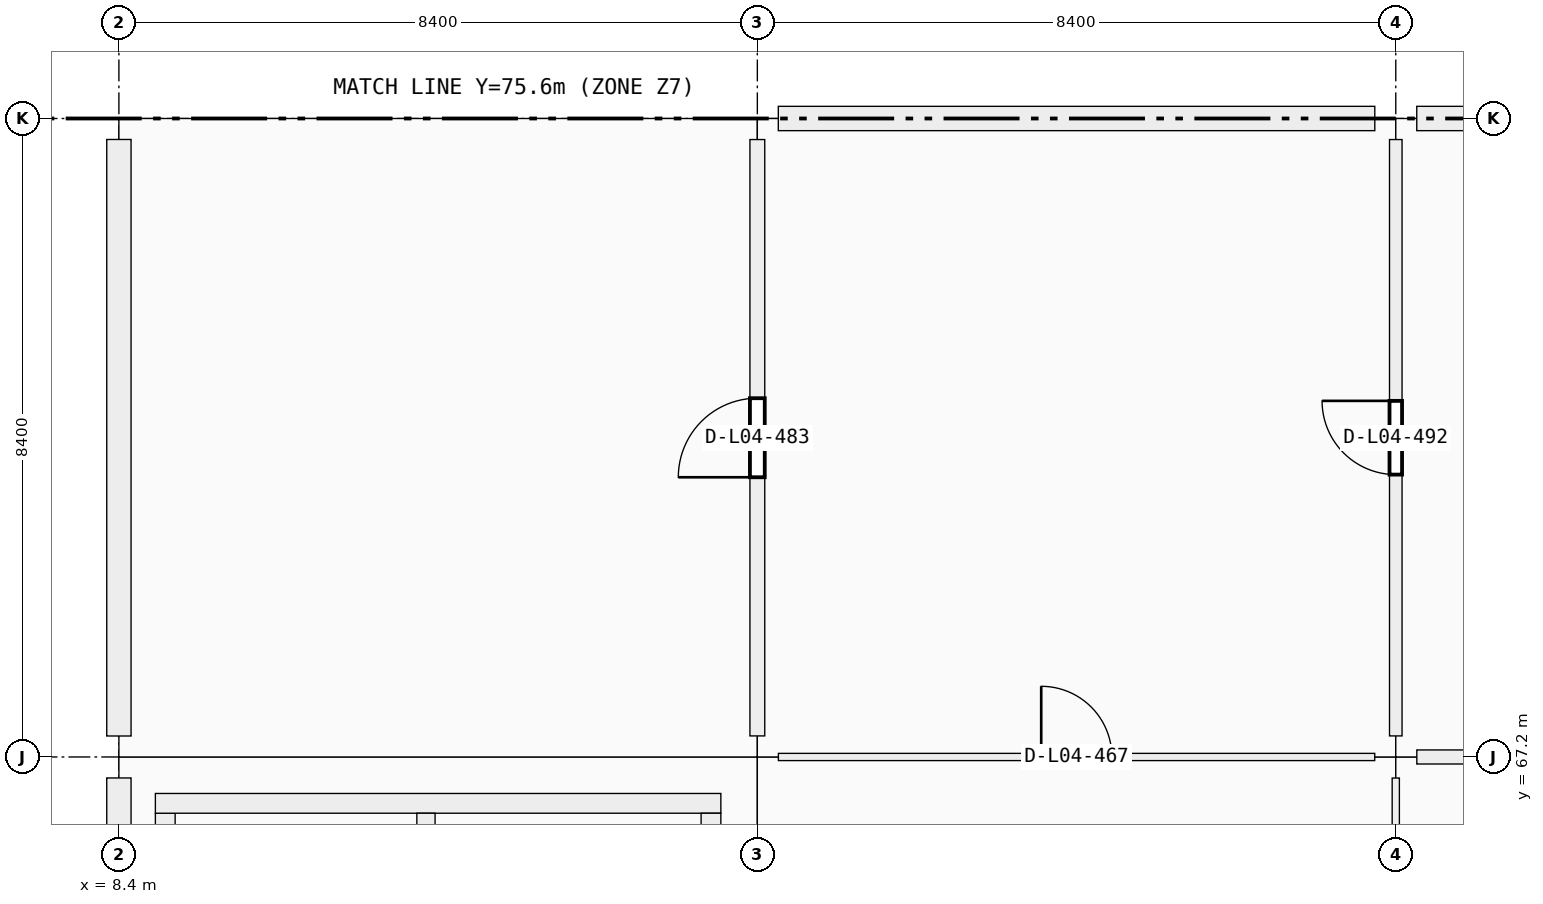
"""IFC4 building model, lengths in metres.
Left out: names, types, materials, properties, quantities, classifications, styles, units other than length and angle.
Written with IfcOpenShell. Run it as: python <this file> out.ifc"""

import sys

from ifc_helpers import new_model, si_unit, direction, frame, frame_2d, origin, origin_2d, place, context, subcontext, project, spatial, rectangle, i_section, extrude, element, fill, save


model = new_model("IFC4")
c1 = context("Model", 3, precision=1e-05, world=origin(), true_north=direction((0.0, 1.0)))
c2 = subcontext(c1, "Body", "Model", "MODEL_VIEW")
j1 = project(units=[si_unit("LENGTHUNIT", "METRE"), si_unit("PLANEANGLEUNIT", "RADIAN")], contexts=[c1])
p1 = place(None, origin())
s1 = spatial("IfcSite", under=j1, at=p1, CompositionType="ELEMENT")
p2 = place(p1, origin())
s2 = spatial("IfcBuilding", under=s1, at=p2, CompositionType="ELEMENT")
p3 = place(p2, frame((0.0, 0.0, 19.08)))
s3 = spatial("IfcBuildingStorey", under=s2, at=p3, CompositionType="ELEMENT", Elevation=19.08)
for number, where, z_axis, x_axis in (
    (1, (8.4, 67.2, 0.0), (0.0, 0.0, 1.0), (1.0, 0.0, 0.0)),
    (2, (8.4, 75.6, 0.0), (0.0, 0.0, 1.0), (1.0, 0.0, 0.0)),
    (3, (16.8, 67.2, 0.0), (0.0, 0.0, 1.0), (1.0, 0.0, 0.0)),
    (4, (16.8, 75.6, 0.0), (0.0, 0.0, 1.0), (1.0, 0.0, 0.0)),
    (5, (25.2, 67.2, 0.0), (0.0, 0.0, 1.0), (1.0, 0.0, 0.0)),
    (6, (25.2, 75.6, 0.0), (0.0, 0.0, 1.0), (1.0, 0.0, 0.0)),
):
    element("IfcColumn", number, at=place(p3, frame(where, z_axis=z_axis, x_axis=x_axis)), inside=s3, PredefinedType="COLUMN", context=c2, shape_type="SweptSolid", body=[
        extrude(rectangle(XDim=0.55, YDim=0.55, at=origin_2d()), origin(), (0.0, 0.0, 1.0), 4.16),
    ])
for number, where, z_axis, x_axis in (
    (7, (16.8, 67.2, 4.16), (0.0, 0.0, 1.0), (1.0, 0.0, 0.0)),
    (8, (25.2, 67.2, 4.16), (0.0, 0.0, 1.0), (1.0, 0.0, 0.0)),
    (9, (16.8, 75.6, 4.16), (0.0, 0.0, 1.0), (1.0, 0.0, 0.0)),
    (10, (25.2, 75.6, 4.16), (0.0, 0.0, 1.0), (1.0, 0.0, 0.0)),
):
    element("IfcColumn", number, at=place(p3, frame(where, z_axis=z_axis, x_axis=x_axis)), inside=s3, PredefinedType="COLUMN", context=c2, shape_type="SweptSolid", body=[
        extrude(i_section(OverallWidth=0.305, OverallDepth=0.308, WebThickness=0.01, FlangeThickness=0.015, FilletRadius=0.017, at=origin_2d()), origin(), (0.0, 0.0, 1.0), 1.925),
    ])
p4 = place(p3, frame((8.4, 59.076, 0.0), z_axis=(0.0, 0.0, 1.0), x_axis=(0.0, 1.0, 0.0)))
e11 = element("IfcWall", 11, at=p4, inside=s3, PredefinedType="SOLIDWALL", context=c2, shape_type="SweptSolid", body=[
    extrude(rectangle(XDim=7.848, YDim=0.32, at=frame_2d((3.924, 0.0))), origin(), (0.0, 0.0, 1.0), 3.37),
])
p5 = place(p3, frame((8.4, 67.476, 0.0), z_axis=(0.0, 0.0, 1.0), x_axis=(0.0, 1.0, 0.0)))
e12 = element("IfcWall", 12, at=p5, inside=s3, PredefinedType="SOLIDWALL", context=c2, shape_type="SweptSolid", body=[
    extrude(rectangle(XDim=7.848, YDim=0.32, at=frame_2d((3.924, 0.0))), origin(), (0.0, 0.0, 1.0), 3.37),
])
p6 = place(p3, frame((17.076, 75.6, 0.0), z_axis=(0.0, 0.0, 1.0), x_axis=(1.0, 0.0, 0.0)))
e13 = element("IfcWall", 13, at=p6, inside=s3, PredefinedType="SOLIDWALL", context=c2, shape_type="SweptSolid", body=[
    extrude(rectangle(XDim=7.848, YDim=0.32, at=frame_2d((3.924, 0.0))), origin(), (0.0, 0.0, 1.0), 3.37),
])
p7 = place(p3, frame((25.476, 75.6, 0.0), z_axis=(0.0, 0.0, 1.0), x_axis=(1.0, 0.0, 0.0)))
e14 = element("IfcWall", 14, at=p7, inside=s3, PredefinedType="SOLIDWALL", context=c2, shape_type="SweptSolid", body=[
    extrude(rectangle(XDim=7.848, YDim=0.32, at=frame_2d((3.924, 0.0))), origin(), (0.0, 0.0, 1.0), 3.37),
])
p8 = place(p7, frame((3.074, 0.0, 0.9)))
e15 = element("IfcOpeningElement", 15, at=p8, cuts=e14, PredefinedType="OPENING", context=c2, shape_type="SweptSolid", body=[
    extrude(rectangle(XDim=1.7, YDim=1.85, at=frame_2d((0.85, 0.925))), frame((0.0, 0.16, 0.0), z_axis=(0.0, -1.0, 0.0), x_axis=(1.0, 0.0, 0.0)), (0.0, 0.0, 1.0), 0.32),
])
p9 = place(p3, frame((9.01, 59.54, 0.0), z_axis=(0.0, 0.0, 1.0), x_axis=(0.0, 1.0, 0.0)))
e16 = element("IfcWall", 16, at=p9, inside=s3, PredefinedType="SHEAR", context=c2, shape_type="SweptSolid", body=[
    extrude(rectangle(XDim=6.92, YDim=0.26, at=frame_2d((3.46, 0.0))), origin(), (0.0, 0.0, 1.0), 4.07),
])
p10 = place(p3, frame((8.88, 66.59, 0.0), z_axis=(0.0, 0.0, 1.0), x_axis=(1.0, 0.0, 0.0)))
e17 = element("IfcWall", 17, at=p10, inside=s3, PredefinedType="SHEAR", context=c2, shape_type="SweptSolid", body=[
    extrude(rectangle(XDim=7.44, YDim=0.26, at=frame_2d((3.72, 0.0))), origin(), (0.0, 0.0, 1.0), 4.07),
])
p11 = place(p3, frame((16.19, 66.46, 0.0), z_axis=(0.0, 0.0, 1.0), x_axis=(0.0, -1.0, 0.0)))
e18 = element("IfcWall", 18, at=p11, inside=s3, PredefinedType="SHEAR", context=c2, shape_type="SweptSolid", body=[
    extrude(rectangle(XDim=6.92, YDim=0.26, at=frame_2d((3.46, 0.0))), origin(), (0.0, 0.0, 1.0), 4.07),
])
p12 = place(p3, frame((12.44, 59.54, 0.0), z_axis=(0.0, 0.0, 1.0), x_axis=(0.0, 1.0, 0.0)))
e19 = element("IfcWall", 19, at=p12, inside=s3, PredefinedType="SHEAR", context=c2, shape_type="SweptSolid", body=[
    extrude(rectangle(XDim=6.92, YDim=0.24, at=frame_2d((3.46, 0.0))), origin(), (0.0, 0.0, 1.0), 4.07),
])
p13 = place(p12, frame((0.12, 0.0, 0.0)))
e20 = element("IfcOpeningElement", 20, at=p13, cuts=e19, PredefinedType="OPENING", context=c2, shape_type="SweptSolid", body=[
    extrude(rectangle(XDim=1.0, YDim=2.15, at=frame_2d((0.5, 1.075))), frame((0.0, 0.12, 0.0), z_axis=(0.0, -1.0, 0.0), x_axis=(1.0, 0.0, 0.0)), (0.0, 0.0, 1.0), 0.24),
])
p14 = place(p3, frame((17.077, 67.2, 0.0), z_axis=(0.0, 0.0, 1.0), x_axis=(1.0, 0.0, 0.0)))
e21 = element("IfcWall", 21, at=p14, inside=s3, PredefinedType="PARTITIONING", context=c2, shape_type="SweptSolid", body=[
    extrude(rectangle(XDim=7.846, YDim=0.095, at=frame_2d((3.923, 0.0))), origin(), (0.0, 0.0, 1.0), 3.19),
])
p15 = place(p14, frame((3.458, 0.0, 0.0)))
e22 = element("IfcOpeningElement", 22, at=p15, cuts=e21, PredefinedType="OPENING", context=c2, shape_type="SweptSolid", body=[
    extrude(rectangle(XDim=0.93, YDim=2.12, at=frame_2d((0.465, 1.06))), frame((0.0, 0.047, 0.0), z_axis=(0.0, -1.0, 0.0), x_axis=(1.0, 0.0, 0.0)), (0.0, 0.0, 1.0), 0.095),
])
p16 = place(p3, frame((25.477, 67.2, 0.0), z_axis=(0.0, 0.0, 1.0), x_axis=(1.0, 0.0, 0.0)))
e23 = element("IfcWall", 23, at=p16, inside=s3, PredefinedType="PARTITIONING", context=c2, shape_type="SweptSolid", body=[
    extrude(rectangle(XDim=7.846, YDim=0.185, at=frame_2d((3.923, 0.0))), origin(), (0.0, 0.0, 1.0), 3.19),
])
p17 = place(p16, frame((3.453, 0.0, 0.0)))
e24 = element("IfcOpeningElement", 24, at=p17, cuts=e23, PredefinedType="OPENING", context=c2, shape_type="SweptSolid", body=[
    extrude(rectangle(XDim=0.94, YDim=2.15, at=frame_2d((0.47, 1.075))), frame((0.0, 0.093, 0.0), z_axis=(0.0, -1.0, 0.0), x_axis=(1.0, 0.0, 0.0)), (0.0, 0.0, 1.0), 0.185),
])
p18 = place(p3, frame((16.8, 67.477, 0.0), z_axis=(0.0, 0.0, 1.0), x_axis=(0.0, 1.0, 0.0)))
e25 = element("IfcWall", 25, at=p18, inside=s3, PredefinedType="PARTITIONING", context=c2, shape_type="SweptSolid", body=[
    extrude(rectangle(XDim=7.846, YDim=0.195, at=frame_2d((3.923, 0.0))), origin(), (0.0, 0.0, 1.0), 3.19),
])
p19 = place(p18, frame((3.403, 0.0, 0.0)))
e26 = element("IfcOpeningElement", 26, at=p19, cuts=e25, PredefinedType="OPENING", context=c2, shape_type="SweptSolid", body=[
    extrude(rectangle(XDim=1.04, YDim=2.2, at=frame_2d((0.52, 1.1))), frame((0.0, 0.098, 0.0), z_axis=(0.0, -1.0, 0.0), x_axis=(1.0, 0.0, 0.0)), (0.0, 0.0, 1.0), 0.195),
])
p20 = place(p3, frame((25.2, 59.077, 0.0), z_axis=(0.0, 0.0, 1.0), x_axis=(0.0, 1.0, 0.0)))
e27 = element("IfcWall", 27, at=p20, inside=s3, PredefinedType="PARTITIONING", context=c2, shape_type="SweptSolid", body=[
    extrude(rectangle(XDim=7.846, YDim=0.095, at=frame_2d((3.923, 0.0))), origin(), (0.0, 0.0, 1.0), 3.19),
])
p21 = place(p20, frame((3.433, 0.0, 0.0)))
e28 = element("IfcOpeningElement", 28, at=p21, cuts=e27, PredefinedType="OPENING", context=c2, shape_type="SweptSolid", body=[
    extrude(rectangle(XDim=0.98, YDim=2.18, at=frame_2d((0.49, 1.09))), frame((0.0, 0.047, 0.0), z_axis=(0.0, -1.0, 0.0), x_axis=(1.0, 0.0, 0.0)), (0.0, 0.0, 1.0), 0.095),
])
p22 = place(p3, frame((25.2, 67.477, 0.0), z_axis=(0.0, 0.0, 1.0), x_axis=(0.0, 1.0, 0.0)))
e29 = element("IfcWall", 29, at=p22, inside=s3, PredefinedType="PARTITIONING", context=c2, shape_type="SweptSolid", body=[
    extrude(rectangle(XDim=7.846, YDim=0.165, at=frame_2d((3.923, 0.0))), origin(), (0.0, 0.0, 1.0), 3.19),
])
p23 = place(p22, frame((3.438, 0.0, 0.0)))
e30 = element("IfcOpeningElement", 30, at=p23, cuts=e29, PredefinedType="OPENING", context=c2, shape_type="SweptSolid", body=[
    extrude(rectangle(XDim=0.97, YDim=2.12, at=frame_2d((0.485, 1.06))), frame((0.0, 0.083, 0.0), z_axis=(0.0, -1.0, 0.0), x_axis=(1.0, 0.0, 0.0)), (0.0, 0.0, 1.0), 0.165),
])
p24 = place(p15, origin())
e31 = element("IfcDoor", 31, at=p24, inside=s3, OperationType="SINGLE_SWING_LEFT", PredefinedType="DOOR", context=c2, shape_type="SweptSolid", body=[
    extrude(rectangle(XDim=0.93, YDim=2.12, at=frame_2d((0.465, 1.06))), frame((0.0, 0.025, 0.0), z_axis=(0.0, -1.0, 0.0), x_axis=(1.0, 0.0, 0.0)), (0.0, 0.0, 1.0), 0.05),
])
fill(e22, e31)
p25 = place(p19, origin())
e32 = element("IfcDoor", 32, at=p25, inside=s3, OperationType="SINGLE_SWING_LEFT", PredefinedType="DOOR", context=c2, shape_type="SweptSolid", body=[
    extrude(rectangle(XDim=1.04, YDim=2.2, at=frame_2d((0.52, 1.1))), frame((0.0, 0.025, 0.0), z_axis=(0.0, -1.0, 0.0), x_axis=(1.0, 0.0, 0.0)), (0.0, 0.0, 1.0), 0.05),
])
fill(e26, e32)
p26 = place(p23, origin())
e33 = element("IfcDoor", 33, at=p26, inside=s3, OperationType="SINGLE_SWING_RIGHT", PredefinedType="DOOR", context=c2, shape_type="SweptSolid", body=[
    extrude(rectangle(XDim=0.97, YDim=2.12, at=frame_2d((0.485, 1.06))), frame((0.0, 0.025, 0.0), z_axis=(0.0, -1.0, 0.0), x_axis=(1.0, 0.0, 0.0)), (0.0, 0.0, 1.0), 0.05),
])
fill(e30, e33)
save(model, sys.argv[1])
